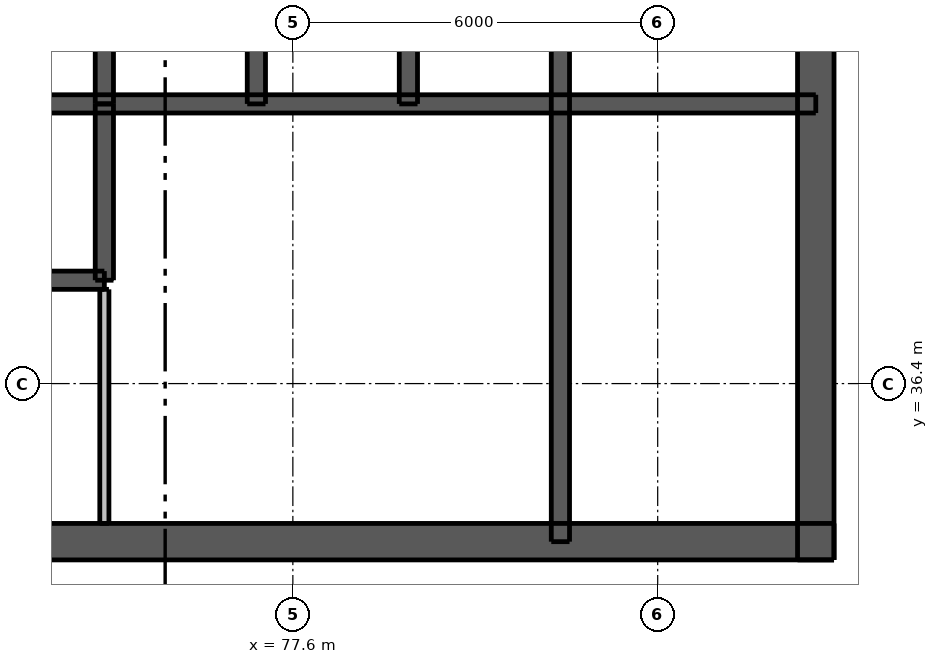
"""IFC4 building model, lengths in metres.
Left out: names, types, materials, properties, quantities, classifications, styles, units other than length and angle.
Written with IfcOpenShell. Run it as: python <this file> out.ifc"""

import sys

from ifc_helpers import new_model, si_unit, direction, frame, frame_2d, origin, place, context, subcontext, project, spatial, rectangle, extrude, element, fill, save


model = new_model("IFC4")
c1 = context("Model", 3, precision=1e-05, world=origin(), true_north=direction((0.0, 1.0)))
c2 = subcontext(c1, "Body", "Model", "MODEL_VIEW")
j1 = project(units=[si_unit("LENGTHUNIT", "METRE"), si_unit("PLANEANGLEUNIT", "RADIAN")], contexts=[c1])
p1 = place(None, origin())
s1 = spatial("IfcSite", under=j1, at=p1, CompositionType="ELEMENT")
p2 = place(p1, origin())
s2 = spatial("IfcBuilding", under=s1, at=p2, CompositionType="ELEMENT")
p3 = place(p2, frame((0.0, 0.0, 196.9)))
s3 = spatial("IfcBuildingStorey", under=s2, at=p3, CompositionType="ELEMENT", Elevation=196.9)
p4 = place(p3, frame((62.5, 33.8, 0.0), z_axis=(0.0, 0.0, 1.0), x_axis=(1.0, 0.0, 0.0)))
e1 = element("IfcWall", 1, at=p4, inside=s3, PredefinedType="SHEAR", context=c2, shape_type="SweptSolid", body=[
    extrude(rectangle(XDim=24.0, YDim=0.6, at=frame_2d((12.0, 0.0))), origin(), (0.0, 0.0, 1.0), 3.05),
])
p5 = place(p4, frame((1.925, 0.0, 0.0)))
e2 = element("IfcOpeningElement", 2, at=p5, cuts=e1, PredefinedType="OPENING", context=c2, shape_type="SweptSolid", body=[
    extrude(rectangle(XDim=1.1, YDim=2.1, at=frame_2d((0.55, 1.05))), frame((0.0, 0.31, 0.0), z_axis=(0.0, -1.0, 0.0), x_axis=(1.0, 0.0, 0.0)), (0.0, 0.0, 1.0), 0.62),
])
p6 = place(p4, frame((20.975, 0.0, 0.0)))
e3 = element("IfcOpeningElement", 3, at=p6, cuts=e1, PredefinedType="OPENING", context=c2, shape_type="SweptSolid", body=[
    extrude(rectangle(XDim=1.1, YDim=2.1, at=frame_2d((0.55, 1.05))), frame((0.0, 0.31, 0.0), z_axis=(0.0, -1.0, 0.0), x_axis=(1.0, 0.0, 0.0)), (0.0, 0.0, 1.0), 0.62),
])
p7 = place(p4, frame((8.0, 0.0, 0.0)))
e4 = element("IfcOpeningElement", 4, at=p7, cuts=e1, PredefinedType="OPENING", context=c2, shape_type="SweptSolid", body=[
    extrude(rectangle(XDim=1.1, YDim=2.1, at=frame_2d((0.55, 1.05))), frame((0.0, 0.31, 0.0), z_axis=(0.0, -1.0, 0.0), x_axis=(1.0, 0.0, 0.0)), (0.0, 0.0, 1.0), 0.62),
])
p8 = place(p4, frame((15.3, 0.0, 0.0)))
e5 = element("IfcOpeningElement", 5, at=p8, cuts=e1, PredefinedType="OPENING", context=c2, shape_type="SweptSolid", body=[
    extrude(rectangle(XDim=0.9, YDim=2.1, at=frame_2d((0.45, 1.05))), frame((0.0, 0.31, 0.0), z_axis=(0.0, -1.0, 0.0), x_axis=(1.0, 0.0, 0.0)), (0.0, 0.0, 1.0), 0.62),
])
p9 = place(p3, frame((86.2, 33.5, 0.0), z_axis=(0.0, 0.0, 1.0), x_axis=(0.0, 1.0, 0.0)))
e6 = element("IfcWall", 6, at=p9, inside=s3, PredefinedType="SHEAR", context=c2, shape_type="SweptSolid", body=[
    extrude(rectangle(XDim=24.0, YDim=0.6, at=frame_2d((12.0, 0.0))), origin(), (0.0, 0.0, 1.0), 3.05),
])
p10 = place(p9, frame((11.2, 0.0, 0.0)))
e7 = element("IfcOpeningElement", 7, at=p10, cuts=e6, PredefinedType="OPENING", context=c2, shape_type="SweptSolid", body=[
    extrude(rectangle(XDim=1.6, YDim=2.1, at=frame_2d((0.8, 1.05))), frame((0.0, 0.31, 0.0), z_axis=(0.0, -1.0, 0.0), x_axis=(1.0, 0.0, 0.0)), (0.0, 0.0, 1.0), 0.62),
])
p11 = place(p3, frame((62.8, 41.0, 0.0), z_axis=(0.0, 0.0, 1.0), x_axis=(1.0, 0.0, 0.0)))
e8 = element("IfcWall", 8, at=p11, inside=s3, PredefinedType="SHEAR", context=c2, shape_type="SweptSolid", body=[
    extrude(rectangle(XDim=23.4, YDim=0.3, at=frame_2d((11.7, 0.0))), origin(), (0.0, 0.0, 1.0), 3.05),
])
p12 = place(p3, frame((82.0, 33.8, 0.0), z_axis=(0.0, 0.0, 1.0), x_axis=(0.0, 1.0, 0.0)))
e9 = element("IfcWall", 9, at=p12, inside=s3, PredefinedType="SHEAR", context=c2, shape_type="SweptSolid", body=[
    extrude(rectangle(XDim=10.1, YDim=0.3, at=frame_2d((5.05, 0.0))), origin(), (0.0, 0.0, 1.0), 3.05),
])
for number, where, z_axis, x_axis in (
    (10, (74.5, 41.0, 0.0), (0.0, 0.0, 1.0), (0.0, 1.0, 0.0)),
    (11, (77.0, 41.0, 0.0), (0.0, 0.0, 1.0), (0.0, 1.0, 0.0)),
    (12, (79.5, 41.0, 0.0), (0.0, 0.0, 1.0), (0.0, 1.0, 0.0)),
):
    element("IfcWall", number, at=place(p3, frame(where, z_axis=z_axis, x_axis=x_axis)), inside=s3, PredefinedType="SHEAR", context=c2, shape_type="SweptSolid", body=[
        extrude(rectangle(XDim=2.9, YDim=0.3, at=frame_2d((1.45, 0.0))), origin(), (0.0, 0.0, 1.0), 3.05),
    ])
p13 = place(p3, frame((67.0, 38.1, 0.0), z_axis=(0.0, 0.0, 1.0), x_axis=(1.0, 0.0, 0.0)))
e13 = element("IfcWall", 13, at=p13, inside=s3, PredefinedType="SHEAR", context=c2, shape_type="SweptSolid", body=[
    extrude(rectangle(XDim=7.5, YDim=0.3, at=frame_2d((3.75, 0.0))), origin(), (0.0, 0.0, 1.0), 3.05),
])
p14 = place(p13, frame((0.7, 0.0, 0.0)))
e14 = element("IfcOpeningElement", 14, at=p14, cuts=e13, PredefinedType="OPENING", context=c2, shape_type="SweptSolid", body=[
    extrude(rectangle(XDim=1.1, YDim=2.1, at=frame_2d((0.55, 1.05))), frame((0.0, 0.16, 0.0), z_axis=(0.0, -1.0, 0.0), x_axis=(1.0, 0.0, 0.0)), (0.0, 0.0, 1.0), 0.32),
])
p15 = place(p13, frame((3.2, 0.0, 0.0)))
e15 = element("IfcOpeningElement", 15, at=p15, cuts=e13, PredefinedType="OPENING", context=c2, shape_type="SweptSolid", body=[
    extrude(rectangle(XDim=1.1, YDim=2.1, at=frame_2d((0.55, 1.05))), frame((0.0, 0.16, 0.0), z_axis=(0.0, -1.0, 0.0), x_axis=(1.0, 0.0, 0.0)), (0.0, 0.0, 1.0), 0.32),
])
p16 = place(p13, frame((5.65, 0.0, 0.0)))
e16 = element("IfcOpeningElement", 16, at=p16, cuts=e13, PredefinedType="OPENING", context=c2, shape_type="SweptSolid", body=[
    extrude(rectangle(XDim=1.2, YDim=2.1, at=frame_2d((0.6, 1.05))), frame((0.0, 0.16, 0.0), z_axis=(0.0, -1.0, 0.0), x_axis=(1.0, 0.0, 0.0)), (0.0, 0.0, 1.0), 0.32),
])
p17 = place(p3, frame((74.5, 38.1, 0.0), z_axis=(0.0, 0.0, 1.0), x_axis=(0.0, 1.0, 0.0)))
e17 = element("IfcWall", 17, at=p17, inside=s3, PredefinedType="SHEAR", context=c2, shape_type="SweptSolid", body=[
    extrude(rectangle(XDim=2.9, YDim=0.3, at=frame_2d((1.45, 0.0))), origin(), (0.0, 0.0, 1.0), 3.05),
])
p18 = place(p3, frame((74.5, 34.1, 0.0), z_axis=(0.0, 0.0, 1.0), x_axis=(0.0, 1.0, 0.0)))
e18 = element("IfcWall", 18, at=p18, inside=s3, PredefinedType="PLUMBINGWALL", context=c2, shape_type="SweptSolid", body=[
    extrude(rectangle(XDim=3.85, YDim=0.15, at=frame_2d((1.925, 0.0))), origin(), (0.0, 0.0, 1.0), 3.05),
])
p19 = place(p6, origin())
e19 = element("IfcDoor", 19, at=p19, inside=s3, OperationType="SINGLE_SWING_RIGHT", PredefinedType="DOOR", context=c2, shape_type="SweptSolid", body=[
    extrude(rectangle(XDim=1.1, YDim=2.1, at=frame_2d((0.55, 1.05))), frame((0.0, 0.288, 0.0), z_axis=(0.0, -1.0, 0.0), x_axis=(1.0, 0.0, 0.0)), (0.0, 0.0, 1.0), 0.05),
])
fill(e3, e19)
p20 = place(p8, origin())
e20 = element("IfcDoor", 20, at=p20, inside=s3, OperationType="SINGLE_SWING_LEFT", PredefinedType="DOOR", context=c2, shape_type="SweptSolid", body=[
    extrude(rectangle(XDim=0.9, YDim=2.1, at=frame_2d((0.45, 1.05))), frame((0.0, 0.288, 0.0), z_axis=(0.0, -1.0, 0.0), x_axis=(1.0, 0.0, 0.0)), (0.0, 0.0, 1.0), 0.05),
])
fill(e5, e20)
p21 = place(p16, origin())
e21 = element("IfcDoor", 21, at=p21, inside=s3, OperationType="DOUBLE_DOOR_SLIDING", PredefinedType="DOOR", context=c2, shape_type="SweptSolid", body=[
    extrude(rectangle(XDim=1.2, YDim=2.1, at=frame_2d((0.6, 1.05))), frame((0.0, 0.025, 0.0), z_axis=(0.0, -1.0, 0.0), x_axis=(1.0, 0.0, 0.0)), (0.0, 0.0, 1.0), 0.05),
])
fill(e16, e21)
save(model, sys.argv[1])
